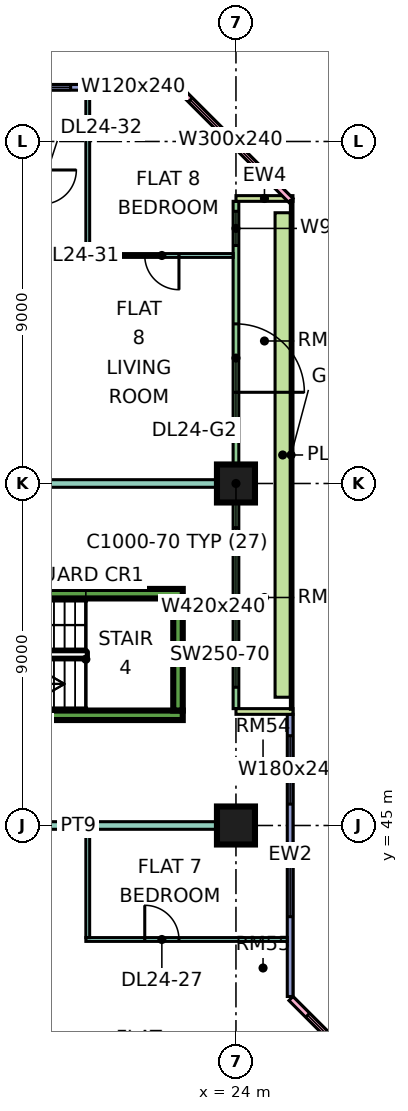
"""IFC4 building model, lengths in metres.
Left out: names, types, materials, properties, quantities, classifications, styles, units other than length and angle.
Written with IfcOpenShell. Run it as: python <this file> out.ifc"""

import sys

from ifc_helpers import new_model, si_unit, direction, frame, frame_2d, origin, origin_2d, place, context, subcontext, project, spatial, rectangle, extrude, element, fill, save


model = new_model("IFC4")
c1 = context("Model", 3, precision=1e-05, world=origin(), true_north=direction((0.0, 1.0)))
c2 = subcontext(c1, "Body", "Model", "MODEL_VIEW")
j1 = project(units=[si_unit("LENGTHUNIT", "METRE"), si_unit("PLANEANGLEUNIT", "RADIAN")], contexts=[c1])
p1 = place(None, origin())
s1 = spatial("IfcSite", under=j1, at=p1, CompositionType="ELEMENT")
p2 = place(p1, origin())
s2 = spatial("IfcBuilding", under=s1, at=p2, CompositionType="ELEMENT")
p3 = place(p2, frame((0.0, 0.0, 106.9)))
s3 = spatial("IfcBuildingStorey", under=s2, at=p3, CompositionType="ELEMENT", Elevation=106.9)
for number, where, z_axis, x_axis in (
    (1, (24.0, 45.0, 0.0), (0.0, 0.0, 1.0), (1.0, 0.0, 0.0)),
    (2, (24.0, 54.0, 0.0), (0.0, 0.0, 1.0), (1.0, 0.0, 0.0)),
):
    element("IfcColumn", number, at=place(p3, frame(where, z_axis=z_axis, x_axis=x_axis)), inside=s3, PredefinedType="COLUMN", context=c2, shape_type="SweptSolid", body=[
        extrude(rectangle(XDim=1.0, YDim=1.0, at=origin_2d()), origin(), (0.0, 0.0, 1.0), 3.75),
    ])
for number, where, z_axis, x_axis in (
    (3, (15.6, 47.9, 0.0), (0.0, 0.0, 1.0), (1.0, 0.0, 0.0)),
    (4, (15.6, 51.1, 0.0), (0.0, 0.0, 1.0), (1.0, 0.0, 0.0)),
):
    element("IfcWall", number, at=place(p3, frame(where, z_axis=z_axis, x_axis=x_axis)), inside=s3, PredefinedType="SHEAR", context=c2, shape_type="SweptSolid", body=[
        extrude(rectangle(XDim=7.0, YDim=0.25, at=frame_2d((3.5, 0.0))), origin(), (0.0, 0.0, 1.0), 3.75),
    ])
p4 = place(p3, frame((22.475, 48.025, 0.0), z_axis=(0.0, 0.0, 1.0), x_axis=(0.0, 1.0, 0.0)))
e5 = element("IfcWall", 5, at=p4, inside=s3, PredefinedType="SHEAR", context=c2, shape_type="SweptSolid", body=[
    extrude(rectangle(XDim=2.95, YDim=0.25, at=frame_2d((1.475, 0.0))), origin(), (0.0, 0.0, 1.0), 3.75),
])
p5 = place(p3, frame((28.447, 37.447, 0.0), z_axis=(0.0, 0.0, 1.0), x_axis=(-0.707106781187, 0.707106781187, 0.0)))
e6 = element("IfcWall", 6, at=p5, inside=s3, PredefinedType="SOLIDWALL", context=c2, shape_type="SweptSolid", body=[
    extrude(rectangle(XDim=4.243, YDim=0.15, at=frame_2d((2.121, 0.0))), origin(), (0.0, 0.0, 1.0), 3.35),
])
p6 = place(p5, frame((0.621, 0.0, 0.45)))
e7 = element("IfcOpeningElement", 7, at=p6, cuts=e6, PredefinedType="OPENING", context=c2, shape_type="SweptSolid", body=[
    extrude(rectangle(XDim=3.0, YDim=2.4, at=frame_2d((1.5, 1.2))), frame((0.0, 0.085, 0.0), z_axis=(0.0, -1.0, 0.0), x_axis=(1.0, 0.0, 0.0)), (0.0, 0.0, 1.0), 0.17),
])
p7 = place(p3, frame((25.425, 40.5, 0.0), z_axis=(0.0, 0.0, 1.0), x_axis=(0.0, 1.0, 0.0)))
e8 = element("IfcWall", 8, at=p7, inside=s3, PredefinedType="SOLIDWALL", context=c2, shape_type="SweptSolid", body=[
    extrude(rectangle(XDim=7.425, YDim=0.15, at=frame_2d((3.712, 0.0))), origin(), (0.0, 0.0, 1.0), 3.35),
])
p8 = place(p7, frame((2.1, 0.0, 0.45)))
e9 = element("IfcOpeningElement", 9, at=p8, cuts=e8, PredefinedType="OPENING", context=c2, shape_type="SweptSolid", body=[
    extrude(rectangle(XDim=1.8, YDim=2.4, at=frame_2d((0.9, 1.2))), frame((0.0, 0.085, 0.0), z_axis=(0.0, -1.0, 0.0), x_axis=(1.0, 0.0, 0.0)), (0.0, 0.0, 1.0), 0.17),
])
p9 = place(p7, frame((5.062, 0.0, 0.45)))
e10 = element("IfcOpeningElement", 10, at=p9, cuts=e8, PredefinedType="OPENING", context=c2, shape_type="SweptSolid", body=[
    extrude(rectangle(XDim=1.8, YDim=2.4, at=frame_2d((0.9, 1.2))), frame((0.0, 0.085, 0.0), z_axis=(0.0, -1.0, 0.0), x_axis=(1.0, 0.0, 0.0)), (0.0, 0.0, 1.0), 0.17),
])
p10 = place(p3, frame((24.0, 48.075, 0.0), z_axis=(0.0, 0.0, 1.0), x_axis=(0.0, 1.0, 0.0)))
e11 = element("IfcWall", 11, at=p10, inside=s3, PredefinedType="SOLIDWALL", context=c2, shape_type="SweptSolid", body=[
    extrude(rectangle(XDim=13.35, YDim=0.15, at=frame_2d((6.675, 0.0))), origin(), (0.0, 0.0, 1.0), 3.35),
])
p11 = place(p10, frame((0.562, 0.0, 0.45)))
e12 = element("IfcOpeningElement", 12, at=p11, cuts=e11, PredefinedType="OPENING", context=c2, shape_type="SweptSolid", body=[
    extrude(rectangle(XDim=4.2, YDim=2.4, at=frame_2d((2.1, 1.2))), frame((0.0, 0.085, 0.0), z_axis=(0.0, -1.0, 0.0), x_axis=(1.0, 0.0, 0.0)), (0.0, 0.0, 1.0), 0.17),
])
p12 = place(p10, frame((8.325, 0.0, 0.0)))
e13 = element("IfcOpeningElement", 13, at=p12, cuts=e11, PredefinedType="OPENING", context=c2, shape_type="SweptSolid", body=[
    extrude(rectangle(XDim=1.8, YDim=2.4, at=frame_2d((0.9, 1.2))), frame((0.0, 0.085, 0.0), z_axis=(0.0, -1.0, 0.0), x_axis=(1.0, 0.0, 0.0)), (0.0, 0.0, 1.0), 0.17),
])
p13 = place(p10, frame((12.188, 0.0, 0.45)))
e14 = element("IfcOpeningElement", 14, at=p13, cuts=e11, PredefinedType="OPENING", context=c2, shape_type="SweptSolid", body=[
    extrude(rectangle(XDim=0.9, YDim=2.4, at=frame_2d((0.45, 1.2))), frame((0.0, 0.085, 0.0), z_axis=(0.0, -1.0, 0.0), x_axis=(1.0, 0.0, 0.0)), (0.0, 0.0, 1.0), 0.17),
])
for number, where, z_axis, x_axis in (
    (15, (25.5, 48.0, 0.0), (0.0, 0.0, 1.0), (-1.0, 0.0, 0.0)),
    (16, (25.5, 61.5, 0.0), (0.0, 0.0, 1.0), (-1.0, 0.0, 0.0)),
):
    element("IfcWall", number, at=place(p3, frame(where, z_axis=z_axis, x_axis=x_axis)), inside=s3, PredefinedType="SOLIDWALL", context=c2, shape_type="SweptSolid", body=[
        extrude(rectangle(XDim=1.5, YDim=0.15, at=frame_2d((0.75, 0.0))), origin(), (0.0, 0.0, 1.0), 3.35),
    ])
p14 = place(p3, frame((25.447, 61.447, 0.0), z_axis=(0.0, 0.0, 1.0), x_axis=(-0.707106781187, 0.707106781187, 0.0)))
e17 = element("IfcWall", 17, at=p14, inside=s3, PredefinedType="SOLIDWALL", context=c2, shape_type="SweptSolid", body=[
    extrude(rectangle(XDim=4.243, YDim=0.15, at=frame_2d((2.121, 0.0))), origin(), (0.0, 0.0, 1.0), 3.35),
])
p15 = place(p14, frame((0.744, 0.0, 0.45)))
e18 = element("IfcOpeningElement", 18, at=p15, cuts=e17, PredefinedType="OPENING", context=c2, shape_type="SweptSolid", body=[
    extrude(rectangle(XDim=3.0, YDim=2.4, at=frame_2d((1.5, 1.2))), frame((0.0, 0.085, 0.0), z_axis=(0.0, -1.0, 0.0), x_axis=(1.0, 0.0, 0.0)), (0.0, 0.0, 1.0), 0.17),
])
p16 = place(p3, frame((22.5, 64.425, 0.0), z_axis=(0.0, 0.0, 1.0), x_axis=(-1.0, 0.0, 0.0)))
e19 = element("IfcWall", 19, at=p16, inside=s3, PredefinedType="SOLIDWALL", context=c2, shape_type="SweptSolid", body=[
    extrude(rectangle(XDim=10.425, YDim=0.15, at=frame_2d((5.212, 0.0))), origin(), (0.0, 0.0, 1.0), 3.35),
])
p17 = place(p16, frame((0.6, 0.0, 0.45)))
e20 = element("IfcOpeningElement", 20, at=p17, cuts=e19, PredefinedType="OPENING", context=c2, shape_type="SweptSolid", body=[
    extrude(rectangle(XDim=1.2, YDim=2.4, at=frame_2d((0.6, 1.2))), frame((0.0, 0.085, 0.0), z_axis=(0.0, -1.0, 0.0), x_axis=(1.0, 0.0, 0.0)), (0.0, 0.0, 1.0), 0.17),
])
p18 = place(p16, frame((2.85, 0.0, 0.45)))
e21 = element("IfcOpeningElement", 21, at=p18, cuts=e19, PredefinedType="OPENING", context=c2, shape_type="SweptSolid", body=[
    extrude(rectangle(XDim=1.2, YDim=2.4, at=frame_2d((0.6, 1.2))), frame((0.0, 0.085, 0.0), z_axis=(0.0, -1.0, 0.0), x_axis=(1.0, 0.0, 0.0)), (0.0, 0.0, 1.0), 0.17),
])
p19 = place(p3, frame((25.229, 48.375, 0.0), z_axis=(0.0, 0.0, 1.0), x_axis=(0.0, 1.0, 0.0)))
e22 = element("IfcWall", 22, at=p19, inside=s3, PredefinedType="SOLIDWALL", context=c2, shape_type="SweptSolid", body=[
    extrude(rectangle(XDim=12.75, YDim=0.4, at=frame_2d((6.375, 0.0))), origin(), (0.0, 0.0, 1.0), 0.7),
])
p20 = place(p3, frame((15.7, 45.0, 0.0), z_axis=(0.0, 0.0, 1.0), x_axis=(1.0, 0.0, 0.0)))
e23 = element("IfcWall", 23, at=p20, inside=s3, PredefinedType="PARTITIONING", context=c2, shape_type="SweptSolid", body=[
    extrude(rectangle(XDim=8.3, YDim=0.2, at=frame_2d((4.15, 0.0))), origin(), (0.0, 0.0, 1.0), 3.35),
])
p21 = place(p3, frame((15.7, 54.0, 0.0), z_axis=(0.0, 0.0, 1.0), x_axis=(1.0, 0.0, 0.0)))
e24 = element("IfcWall", 24, at=p21, inside=s3, PredefinedType="PARTITIONING", context=c2, shape_type="SweptSolid", body=[
    extrude(rectangle(XDim=8.226, YDim=0.2, at=frame_2d((4.113, 0.0))), origin(), (0.0, 0.0, 1.0), 3.35),
])
p22 = place(p3, frame((20.05, 42.0, 0.0), z_axis=(0.0, 0.0, 1.0), x_axis=(1.0, 0.0, 0.0)))
e25 = element("IfcWall", 25, at=p22, inside=s3, PredefinedType="PARTITIONING", context=c2, shape_type="SweptSolid", body=[
    extrude(rectangle(XDim=5.3, YDim=0.1, at=frame_2d((2.65, 0.0))), origin(), (0.0, 0.0, 1.0), 3.35),
])
p23 = place(p22, frame((1.55, 0.0, 0.0)))
e26 = element("IfcOpeningElement", 26, at=p23, cuts=e25, PredefinedType="OPENING", context=c2, shape_type="SweptSolid", body=[
    extrude(rectangle(XDim=0.9, YDim=2.1, at=frame_2d((0.45, 1.05))), frame((0.0, 0.06, 0.0), z_axis=(0.0, -1.0, 0.0), x_axis=(1.0, 0.0, 0.0)), (0.0, 0.0, 1.0), 0.12),
])
p24 = place(p3, frame((20.1, 42.05, 0.0), z_axis=(0.0, 0.0, 1.0), x_axis=(0.0, 1.0, 0.0)))
e27 = element("IfcWall", 27, at=p24, inside=s3, PredefinedType="PARTITIONING", context=c2, shape_type="SweptSolid", body=[
    extrude(rectangle(XDim=2.85, YDim=0.1, at=frame_2d((1.425, 0.0))), origin(), (0.0, 0.0, 1.0), 3.35),
])
p25 = place(p3, frame((20.1, 59.95, 0.0), z_axis=(0.0, 0.0, 1.0), x_axis=(0.0, 1.0, 0.0)))
e28 = element("IfcWall", 28, at=p25, inside=s3, PredefinedType="PARTITIONING", context=c2, shape_type="SweptSolid", body=[
    extrude(rectangle(XDim=4.401, YDim=0.1, at=frame_2d((2.201, 0.0))), origin(), (0.0, 0.0, 1.0), 3.35),
])
p26 = place(p3, frame((20.15, 60.0, 0.0), z_axis=(0.0, 0.0, 1.0), x_axis=(1.0, 0.0, 0.0)))
e29 = element("IfcWall", 29, at=p26, inside=s3, PredefinedType="PARTITIONING", context=c2, shape_type="SweptSolid", body=[
    extrude(rectangle(XDim=3.776, YDim=0.1, at=frame_2d((1.888, 0.0))), origin(), (0.0, 0.0, 1.0), 3.35),
])
p27 = place(p26, frame((1.45, 0.0, 0.0)))
e30 = element("IfcOpeningElement", 30, at=p27, cuts=e29, PredefinedType="OPENING", context=c2, shape_type="SweptSolid", body=[
    extrude(rectangle(XDim=0.9, YDim=2.1, at=frame_2d((0.45, 1.05))), frame((0.0, 0.06, 0.0), z_axis=(0.0, -1.0, 0.0), x_axis=(1.0, 0.0, 0.0)), (0.0, 0.0, 1.0), 0.12),
])
p28 = place(p6, origin())
e31 = element("IfcWindow", 31, at=p28, inside=s3, PartitioningType="SINGLE_PANEL", PredefinedType="WINDOW", context=c2, shape_type="SweptSolid", body=[
    extrude(rectangle(XDim=3.0, YDim=2.4, at=frame_2d((1.5, 1.2))), frame((0.0, 0.03, 0.0), z_axis=(0.0, -1.0, 0.0), x_axis=(1.0, 0.0, 0.0)), (0.0, 0.0, 1.0), 0.06),
])
fill(e7, e31)
p29 = place(p8, origin())
e32 = element("IfcWindow", 32, at=p29, inside=s3, PartitioningType="SINGLE_PANEL", PredefinedType="WINDOW", context=c2, shape_type="SweptSolid", body=[
    extrude(rectangle(XDim=1.8, YDim=2.4, at=frame_2d((0.9, 1.2))), frame((0.0, 0.03, 0.0), z_axis=(0.0, -1.0, 0.0), x_axis=(1.0, 0.0, 0.0)), (0.0, 0.0, 1.0), 0.06),
])
fill(e9, e32)
p30 = place(p9, origin())
e33 = element("IfcWindow", 33, at=p30, inside=s3, PartitioningType="SINGLE_PANEL", PredefinedType="WINDOW", context=c2, shape_type="SweptSolid", body=[
    extrude(rectangle(XDim=1.8, YDim=2.4, at=frame_2d((0.9, 1.2))), frame((0.0, 0.03, 0.0), z_axis=(0.0, -1.0, 0.0), x_axis=(1.0, 0.0, 0.0)), (0.0, 0.0, 1.0), 0.06),
])
fill(e10, e33)
p31 = place(p11, origin())
e34 = element("IfcWindow", 34, at=p31, inside=s3, PartitioningType="SINGLE_PANEL", PredefinedType="WINDOW", context=c2, shape_type="SweptSolid", body=[
    extrude(rectangle(XDim=4.2, YDim=2.4, at=frame_2d((2.1, 1.2))), frame((0.0, 0.03, 0.0), z_axis=(0.0, -1.0, 0.0), x_axis=(1.0, 0.0, 0.0)), (0.0, 0.0, 1.0), 0.06),
])
fill(e12, e34)
p32 = place(p12, frame((1.8, 0.0, 0.0), z_axis=(0.0, 0.0, 1.0), x_axis=(-1.0, 0.0, 0.0)))
e35 = element("IfcDoor", 35, at=p32, inside=s3, OperationType="DOUBLE_DOOR_SINGLE_SWING", PredefinedType="DOOR", context=c2, shape_type="SweptSolid", body=[
    extrude(rectangle(XDim=1.8, YDim=2.4, at=frame_2d((0.9, 1.2))), frame((0.0, 0.025, 0.0), z_axis=(0.0, -1.0, 0.0), x_axis=(1.0, 0.0, 0.0)), (0.0, 0.0, 1.0), 0.05),
])
fill(e13, e35)
p33 = place(p13, origin())
e36 = element("IfcWindow", 36, at=p33, inside=s3, PartitioningType="SINGLE_PANEL", PredefinedType="WINDOW", context=c2, shape_type="SweptSolid", body=[
    extrude(rectangle(XDim=0.9, YDim=2.4, at=frame_2d((0.45, 1.2))), frame((0.0, 0.03, 0.0), z_axis=(0.0, -1.0, 0.0), x_axis=(1.0, 0.0, 0.0)), (0.0, 0.0, 1.0), 0.06),
])
fill(e14, e36)
p34 = place(p15, origin())
e37 = element("IfcWindow", 37, at=p34, inside=s3, PartitioningType="SINGLE_PANEL", PredefinedType="WINDOW", context=c2, shape_type="SweptSolid", body=[
    extrude(rectangle(XDim=3.0, YDim=2.4, at=frame_2d((1.5, 1.2))), frame((0.0, 0.03, 0.0), z_axis=(0.0, -1.0, 0.0), x_axis=(1.0, 0.0, 0.0)), (0.0, 0.0, 1.0), 0.06),
])
fill(e18, e37)
p35 = place(p17, origin())
e38 = element("IfcWindow", 38, at=p35, inside=s3, PartitioningType="SINGLE_PANEL", PredefinedType="WINDOW", context=c2, shape_type="SweptSolid", body=[
    extrude(rectangle(XDim=1.2, YDim=2.4, at=frame_2d((0.6, 1.2))), frame((0.0, 0.03, 0.0), z_axis=(0.0, -1.0, 0.0), x_axis=(1.0, 0.0, 0.0)), (0.0, 0.0, 1.0), 0.06),
])
fill(e20, e38)
p36 = place(p18, origin())
e39 = element("IfcWindow", 39, at=p36, inside=s3, PartitioningType="SINGLE_PANEL", PredefinedType="WINDOW", context=c2, shape_type="SweptSolid", body=[
    extrude(rectangle(XDim=1.2, YDim=2.4, at=frame_2d((0.6, 1.2))), frame((0.0, 0.03, 0.0), z_axis=(0.0, -1.0, 0.0), x_axis=(1.0, 0.0, 0.0)), (0.0, 0.0, 1.0), 0.06),
])
fill(e21, e39)
p37 = place(p23, origin())
e40 = element("IfcDoor", 40, at=p37, inside=s3, OperationType="SINGLE_SWING_LEFT", PredefinedType="DOOR", context=c2, shape_type="SweptSolid", body=[
    extrude(rectangle(XDim=0.9, YDim=2.1, at=frame_2d((0.45, 1.05))), frame((0.0, 0.025, 0.0), z_axis=(0.0, -1.0, 0.0), x_axis=(1.0, 0.0, 0.0)), (0.0, 0.0, 1.0), 0.05),
])
fill(e26, e40)
p38 = place(p27, origin())
e41 = element("IfcDoor", 41, at=p38, inside=s3, OperationType="SINGLE_SWING_RIGHT", PredefinedType="DOOR", context=c2, shape_type="SweptSolid", body=[
    extrude(rectangle(XDim=0.9, YDim=2.1, at=frame_2d((0.45, 1.05))), frame((0.0, 0.025, 0.0), z_axis=(0.0, -1.0, 0.0), x_axis=(1.0, 0.0, 0.0)), (0.0, 0.0, 1.0), 0.05),
])
fill(e30, e41)
save(model, sys.argv[1])
